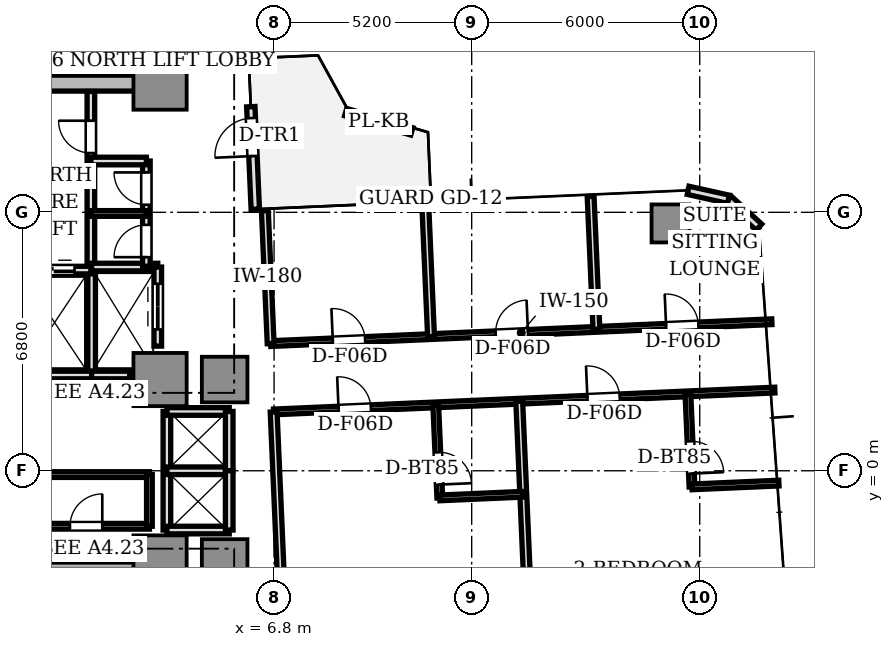
"""IFC4 building model, lengths in metres.
Left out: names, types, materials, properties, quantities, classifications, styles, units other than length and angle.
Written with IfcOpenShell. Run it as: python <this file> out.ifc"""

import sys

from ifc_helpers import new_model, si_unit, direction, frame, frame_2d, origin, origin_2d, place, context, subcontext, project, spatial, rectangle, extrude, source, transform, mapped, element, fill, save


model = new_model("IFC4")
c1 = context("Model", 3, precision=1e-05, world=origin(), true_north=direction((0.0, 1.0)))
c2 = subcontext(c1, "Body", "Model", "MODEL_VIEW")
j1 = project(units=[si_unit("LENGTHUNIT", "METRE"), si_unit("PLANEANGLEUNIT", "RADIAN")], contexts=[c1])
p1 = place(None, origin())
s1 = spatial("IfcSite", under=j1, at=p1, CompositionType="ELEMENT")
p2 = place(p1, origin())
s2 = spatial("IfcBuilding", under=s1, at=p2, CompositionType="ELEMENT")
p3 = place(p2, frame((0.0, 0.0, 131.55)))
s3 = spatial("IfcBuildingStorey", under=s2, at=p3, CompositionType="ELEMENT", Elevation=131.55)
p4 = place(p3, frame((-3.55, 10.2, 0.0), z_axis=(0.0, 0.0, 1.0), x_axis=(1.0, 0.0, 0.0)))
e1 = element("IfcWall", 1, at=p4, inside=s3, PredefinedType="SHEAR", context=c2, shape_type="SweptSolid", body=[
    extrude(rectangle(XDim=7.1, YDim=0.42, at=frame_2d((3.55, 0.0))), origin(), (0.0, 0.0, 1.0), 3.11),
])
m1 = source(origin(), c2, "Body", "SweptSolid", [
    extrude(rectangle(XDim=1.4, YDim=1.4, at=origin_2d()), origin(), (0.0, 0.0, 1.0), 3.11),
])
for number, where, z_axis, x_axis in (
    (2, (3.8, 2.4, 0.0), (0.0, 0.0, 1.0), (1.0, 0.0, 0.0)),
    (3, (3.8, 10.2, 0.0), (0.0, 0.0, 1.0), (1.0, 0.0, 0.0)),
    (4, (3.8, -2.4, 0.0), (0.0, 0.0, 1.0), (1.0, 0.0, 0.0)),
):
    element("IfcColumn", number, at=place(p3, frame(where, z_axis=z_axis, x_axis=x_axis)), inside=s3, PredefinedType="COLUMN", context=c2, shape_type="MappedRepresentation", body=[
        mapped(m1, transform((0.0, 0.0, 0.0), scale=1.0)),
    ])
m2 = source(origin(), c2, "Body", "SweptSolid", [
    extrude(rectangle(XDim=1.2, YDim=1.2, at=origin_2d()), origin(), (0.0, 0.0, 1.0), 3.11),
])
for number, where, z_axis, x_axis in (
    (5, (5.5, 2.4, 0.0), (0.0, 0.0, 1.0), (1.0, 0.0, 0.0)),
    (6, (5.5, -2.4, 0.0), (0.0, 0.0, 1.0), (1.0, 0.0, 0.0)),
):
    element("IfcColumn", number, at=place(p3, frame(where, z_axis=z_axis, x_axis=x_axis)), inside=s3, PredefinedType="COLUMN", context=c2, shape_type="MappedRepresentation", body=[
        mapped(m2, transform((0.0, 0.0, 0.0), scale=1.0)),
    ])
m3 = source(origin(), c2, "Body", "SweptSolid", [
    extrude(rectangle(XDim=1.0, YDim=1.0, at=origin_2d()), origin(), (0.0, 0.0, 1.0), 3.11),
])
p5 = place(p3, frame((17.232, 6.508, 0.0), z_axis=(0.0, 0.0, 1.0), x_axis=(1.0, 0.0, 0.0)))
e7 = element("IfcColumn", 7, at=p5, inside=s3, PredefinedType="COLUMN", context=c2, shape_type="MappedRepresentation", body=[
    mapped(m3, transform((0.0, 0.0, 0.0), scale=1.0)),
])
p6 = place(p3, frame((19.558, 6.409, 0.0), z_axis=(0.0, 0.0, 1.0), x_axis=(-0.737210081318, 0.675663596772, 0.0)))
e8 = element("IfcWall", 8, at=p6, inside=s3, PredefinedType="STANDARD", context=c2, shape_type="SweptSolid", body=[
    extrude(rectangle(XDim=1.087, YDim=0.22, at=frame_2d((0.543, 0.0))), origin(), (0.0, 0.0, 1.0), 3.11),
])
p7 = place(p3, frame((18.756, 7.144, 0.0), z_axis=(0.0, 0.0, 1.0), x_axis=(-0.976282085775, 0.216502399514, 0.0)))
e9 = element("IfcWall", 9, at=p7, inside=s3, PredefinedType="STANDARD", context=c2, shape_type="SweptSolid", body=[
    extrude(rectangle(XDim=1.087, YDim=0.22, at=frame_2d((0.543, 0.0))), origin(), (0.0, 0.0, 1.0), 3.11),
])
p8 = place(p3, frame((6.306, 6.882, 0.0), z_axis=(0.0, 0.0, 1.0), x_axis=(-0.043672655174, 0.999045894436, 0.0)))
e10 = element("IfcWall", 10, at=p8, inside=s3, PredefinedType="STANDARD", context=c2, shape_type="SweptSolid", body=[
    extrude(rectangle(XDim=2.7, YDim=0.22, at=frame_2d((1.35, 0.0))), origin(), (0.0, 0.0, 1.0), 3.11),
])
p9 = place(p8, frame((1.4, 0.0, 0.0)))
e11 = element("IfcOpeningElement", 11, at=p9, cuts=e10, PredefinedType="OPENING", context=c2, shape_type="SweptSolid", body=[
    extrude(rectangle(XDim=1.0, YDim=2.2, at=frame_2d((0.5, 1.1))), frame((0.0, 0.12, 0.0), z_axis=(0.0, -1.0, 0.0), x_axis=(1.0, 0.0, 0.0)), (0.0, 0.0, 1.0), 0.24),
])
p10 = place(p3, frame((10.424, 8.93, 0.0), z_axis=(0.0, 0.0, 1.0), x_axis=(-0.960055834773, 0.279808495436, 0.0)))
e12 = element("IfcWall", 12, at=p10, inside=s3, PredefinedType="PARAPET", context=c2, shape_type="SweptSolid", body=[
    extrude(rectangle(XDim=1.811, YDim=0.2, at=frame_2d((0.906, 0.0))), origin(), (0.0, 0.0, 1.0), 0.65),
])
p11 = place(p3, frame((0.0, -2.5, 0.0), z_axis=(0.0, 0.0, 1.0), x_axis=(1.0, 0.0, 0.0)))
e13 = element("IfcWall", 13, at=p11, inside=s3, PredefinedType="SOLIDWALL", context=c2, shape_type="SweptSolid", body=[
    extrude(rectangle(XDim=3.72, YDim=0.2, at=frame_2d((1.86, 0.0))), origin(), (0.0, 0.0, 1.0), 3.11),
])
p12 = place(p3, frame((1.98, 5.32, 0.0), z_axis=(0.0, 0.0, 1.0), x_axis=(0.0, 1.0, 0.0)))
e14 = element("IfcWall", 14, at=p12, inside=s3, PredefinedType="SOLIDWALL", context=c2, shape_type="SweptSolid", body=[
    extrude(rectangle(XDim=4.66, YDim=0.2, at=frame_2d((2.33, 0.0))), origin(), (0.0, 0.0, 1.0), 2.66),
])
p13 = place(p12, frame((3.04, 0.0, 0.0)))
e15 = element("IfcOpeningElement", 15, at=p13, cuts=e14, PredefinedType="OPENING", context=c2, shape_type="SweptSolid", body=[
    extrude(rectangle(XDim=0.85, YDim=2.1, at=frame_2d((0.425, 1.05))), frame((0.0, 0.11, 0.0), z_axis=(0.0, -1.0, 0.0), x_axis=(1.0, 0.0, 0.0)), (0.0, 0.0, 1.0), 0.22),
])
p14 = place(p3, frame((2.0, 2.5, 0.0), z_axis=(0.0, 0.0, 1.0), x_axis=(0.0, 1.0, 0.0)))
e16 = element("IfcWall", 16, at=p14, inside=s3, PredefinedType="SOLIDWALL", context=c2, shape_type="SweptSolid", body=[
    extrude(rectangle(XDim=2.78, YDim=0.2, at=frame_2d((1.39, 0.0))), origin(), (0.0, 0.0, 1.0), 2.66),
])
p15 = place(p3, frame((0.05, 2.52, 0.0), z_axis=(0.0, 0.0, 1.0), x_axis=(1.0, 0.0, 0.0)))
e17 = element("IfcWall", 17, at=p15, inside=s3, PredefinedType="SOLIDWALL", context=c2, shape_type="SweptSolid", body=[
    extrude(rectangle(XDim=1.95, YDim=0.2, at=frame_2d((0.975, 0.0))), origin(), (0.0, 0.0, 1.0), 2.66),
])
p16 = place(p3, frame((0.05, 5.28, 0.0), z_axis=(0.0, 0.0, 1.0), x_axis=(1.0, 0.0, 0.0)))
e18 = element("IfcWall", 18, at=p16, inside=s3, PredefinedType="SOLIDWALL", context=c2, shape_type="SweptSolid", body=[
    extrude(rectangle(XDim=1.93, YDim=0.2, at=frame_2d((0.965, 0.0))), origin(), (0.0, 0.0, 1.0), 2.66),
])
p17 = place(p16, frame((0.4, 0.0, 0.0)))
e19 = element("IfcOpeningElement", 19, at=p17, cuts=e18, PredefinedType="OPENING", context=c2, shape_type="SweptSolid", body=[
    extrude(rectangle(XDim=1.1, YDim=2.2, at=frame_2d((0.55, 1.1))), frame((0.0, 0.11, 0.0), z_axis=(0.0, -1.0, 0.0), x_axis=(1.0, 0.0, 0.0)), (0.0, 0.0, 1.0), 0.22),
])
p18 = place(p3, frame((2.0, 2.52, 0.0), z_axis=(0.0, 0.0, 1.0), x_axis=(1.0, 0.0, 0.0)))
e20 = element("IfcWall", 20, at=p18, inside=s3, PredefinedType="SOLIDWALL", context=c2, shape_type="SweptSolid", body=[
    extrude(rectangle(XDim=1.0, YDim=0.2, at=frame_2d((0.5, 0.0))), origin(), (0.0, 0.0, 1.0), 2.66),
])
p19 = place(p3, frame((2.0, 5.36, 0.0), z_axis=(0.0, 0.0, 1.0), x_axis=(1.0, 0.0, 0.0)))
e21 = element("IfcWall", 21, at=p19, inside=s3, PredefinedType="SOLIDWALL", context=c2, shape_type="SweptSolid", body=[
    extrude(rectangle(XDim=1.74, YDim=0.2, at=frame_2d((0.87, 0.0))), origin(), (0.0, 0.0, 1.0), 2.66),
])
p20 = place(p3, frame((3.74, 3.28, 0.0), z_axis=(0.0, 0.0, 1.0), x_axis=(0.0, 1.0, 0.0)))
e22 = element("IfcWall", 22, at=p20, inside=s3, PredefinedType="SOLIDWALL", context=c2, shape_type="SweptSolid", body=[
    extrude(rectangle(XDim=2.08, YDim=0.2, at=frame_2d((1.04, 0.0))), origin(), (0.0, 0.0, 1.0), 2.66),
])
p21 = place(p20, frame((0.44, 0.0, 0.0)))
e23 = element("IfcOpeningElement", 23, at=p21, cuts=e22, PredefinedType="OPENING", context=c2, shape_type="SweptSolid", body=[
    extrude(rectangle(XDim=1.2, YDim=2.2, at=frame_2d((0.6, 1.1))), frame((0.0, 0.11, 0.0), z_axis=(0.0, -1.0, 0.0), x_axis=(1.0, 0.0, 0.0)), (0.0, 0.0, 1.0), 0.22),
])
p22 = place(p3, frame((3.98, -1.56, 0.0), z_axis=(0.0, 0.0, 1.0), x_axis=(0.0, 1.0, 0.0)))
e24 = element("IfcWall", 24, at=p22, inside=s3, PredefinedType="SOLIDWALL", context=c2, shape_type="SweptSolid", body=[
    extrude(rectangle(XDim=3.12, YDim=0.2, at=frame_2d((1.56, 0.0))), origin(), (0.0, 0.0, 1.0), 2.28),
])
for number, where, z_axis, x_axis in (
    (25, (3.98, 1.56, 0.0), (0.0, 0.0, 1.0), (1.0, 0.0, 0.0)),
    (26, (3.98, -1.56, 0.0), (0.0, 0.0, 1.0), (1.0, 0.0, 0.0)),
    (27, (3.98, 0.0, 0.0), (0.0, 0.0, 1.0), (1.0, 0.0, 0.0)),
):
    element("IfcWall", number, at=place(p3, frame(where, z_axis=z_axis, x_axis=x_axis)), inside=s3, PredefinedType="SOLIDWALL", context=c2, shape_type="SweptSolid", body=[
        extrude(rectangle(XDim=1.64, YDim=0.2, at=frame_2d((0.82, 0.0))), origin(), (0.0, 0.0, 1.0), 2.66),
    ])
for number, where, z_axis, x_axis in (
    (28, (5.62, 0.0, 0.0), (0.0, 0.0, 1.0), (0.0, 1.0, 0.0)),
    (29, (5.62, -1.56, 0.0), (0.0, 0.0, 1.0), (0.0, 1.0, 0.0)),
):
    element("IfcWall", number, at=place(p3, frame(where, z_axis=z_axis, x_axis=x_axis)), inside=s3, PredefinedType="SOLIDWALL", context=c2, shape_type="SweptSolid", body=[
        extrude(rectangle(XDim=1.56, YDim=0.2, at=frame_2d((0.78, 0.0))), origin(), (0.0, 0.0, 1.0), 2.66),
    ])
p23 = place(p3, frame((3.44, 5.38, 0.0), z_axis=(0.0, 0.0, 1.0), x_axis=(0.0, 1.0, 0.0)))
e30 = element("IfcWall", 30, at=p23, inside=s3, PredefinedType="SOLIDWALL", context=c2, shape_type="SweptSolid", body=[
    extrude(rectangle(XDim=2.77, YDim=0.2, at=frame_2d((1.385, 0.0))), origin(), (0.0, 0.0, 1.0), 2.66),
])
p24 = place(p23, frame((0.24, 0.0, 0.0)))
e31 = element("IfcOpeningElement", 31, at=p24, cuts=e30, PredefinedType="OPENING", context=c2, shape_type="SweptSolid", body=[
    extrude(rectangle(XDim=0.85, YDim=2.1, at=frame_2d((0.425, 1.05))), frame((0.0, 0.11, 0.0), z_axis=(0.0, -1.0, 0.0), x_axis=(1.0, 0.0, 0.0)), (0.0, 0.0, 1.0), 0.22),
])
p25 = place(p23, frame((1.62, 0.0, 0.0)))
e32 = element("IfcOpeningElement", 32, at=p25, cuts=e30, PredefinedType="OPENING", context=c2, shape_type="SweptSolid", body=[
    extrude(rectangle(XDim=0.85, YDim=2.1, at=frame_2d((0.425, 1.05))), frame((0.0, 0.11, 0.0), z_axis=(0.0, -1.0, 0.0), x_axis=(1.0, 0.0, 0.0)), (0.0, 0.0, 1.0), 0.22),
])
p26 = place(p3, frame((1.98, 8.15, 0.0), z_axis=(0.0, 0.0, 1.0), x_axis=(1.0, 0.0, 0.0)))
e33 = element("IfcWall", 33, at=p26, inside=s3, PredefinedType="SOLIDWALL", context=c2, shape_type="SweptSolid", body=[
    extrude(rectangle(XDim=1.46, YDim=0.2, at=frame_2d((0.73, 0.0))), origin(), (0.0, 0.0, 1.0), 2.66),
])
p27 = place(p3, frame((1.98, 6.77, 0.0), z_axis=(0.0, 0.0, 1.0), x_axis=(1.0, 0.0, 0.0)))
e34 = element("IfcWall", 34, at=p27, inside=s3, PredefinedType="PARTITIONING", context=c2, shape_type="SweptSolid", body=[
    extrude(rectangle(XDim=1.46, YDim=0.15, at=frame_2d((0.73, 0.0))), origin(), (0.0, 0.0, 1.0), 2.66),
])
p28 = place(p3, frame((0.38, -0.1, 0.0), z_axis=(0.0, 0.0, 1.0), x_axis=(1.0, 0.0, 0.0)))
e35 = element("IfcWall", 35, at=p28, inside=s3, PredefinedType="PARTITIONING", context=c2, shape_type="SweptSolid", body=[
    extrude(rectangle(XDim=3.14, YDim=0.15, at=frame_2d((1.57, 0.0))), origin(), (0.0, 0.0, 1.0), 2.66),
])
p29 = place(p3, frame((0.38, -1.46, 0.0), z_axis=(0.0, 0.0, 1.0), x_axis=(1.0, 0.0, 0.0)))
e36 = element("IfcWall", 36, at=p29, inside=s3, PredefinedType="PARTITIONING", context=c2, shape_type="SweptSolid", body=[
    extrude(rectangle(XDim=3.14, YDim=0.15, at=frame_2d((1.57, 0.0))), origin(), (0.0, 0.0, 1.0), 2.66),
])
p30 = place(p29, frame((1.05, 0.0, 0.0)))
e37 = element("IfcOpeningElement", 37, at=p30, cuts=e36, PredefinedType="OPENING", context=c2, shape_type="SweptSolid", body=[
    extrude(rectangle(XDim=0.85, YDim=2.1, at=frame_2d((0.425, 1.05))), frame((0.0, 0.085, 0.0), z_axis=(0.0, -1.0, 0.0), x_axis=(1.0, 0.0, 0.0)), (0.0, 0.0, 1.0), 0.17),
])
p31 = place(p3, frame((3.52, -1.46, 0.0), z_axis=(0.0, 0.0, 1.0), x_axis=(0.0, 1.0, 0.0)))
e38 = element("IfcWall", 38, at=p31, inside=s3, PredefinedType="PARTITIONING", context=c2, shape_type="SweptSolid", body=[
    extrude(rectangle(XDim=1.36, YDim=0.15, at=frame_2d((0.68, 0.0))), origin(), (0.0, 0.0, 1.0), 2.28),
])
p32 = place(p3, frame((6.71, 3.346, 0.0), z_axis=(0.0, 0.0, 1.0), x_axis=(0.999048535483, 0.04361219725, 0.0)))
e39 = element("IfcWall", 39, at=p32, inside=s3, PredefinedType="PARTITIONING", context=c2, shape_type="SweptSolid", body=[
    extrude(rectangle(XDim=13.2, YDim=0.15, at=frame_2d((6.6, 0.0))), origin(), (0.0, 0.0, 1.0), 2.63),
])
p33 = place(p32, frame((1.637, 0.0, 0.0)))
e40 = element("IfcOpeningElement", 40, at=p33, cuts=e39, PredefinedType="OPENING", context=c2, shape_type="SweptSolid", body=[
    extrude(rectangle(XDim=0.85, YDim=2.1, at=frame_2d((0.425, 1.05))), frame((0.0, 0.085, 0.0), z_axis=(0.0, -1.0, 0.0), x_axis=(1.0, 0.0, 0.0)), (0.0, 0.0, 1.0), 0.17),
])
p34 = place(p32, frame((5.927, 0.0, 0.0)))
e41 = element("IfcOpeningElement", 41, at=p34, cuts=e39, PredefinedType="OPENING", context=c2, shape_type="SweptSolid", body=[
    extrude(rectangle(XDim=0.85, YDim=2.1, at=frame_2d((0.425, 1.05))), frame((0.0, 0.085, 0.0), z_axis=(0.0, -1.0, 0.0), x_axis=(1.0, 0.0, 0.0)), (0.0, 0.0, 1.0), 0.17),
])
p35 = place(p32, frame((10.415, 0.0, 0.0)))
e42 = element("IfcOpeningElement", 42, at=p35, cuts=e39, PredefinedType="OPENING", context=c2, shape_type="SweptSolid", body=[
    extrude(rectangle(XDim=0.85, YDim=2.1, at=frame_2d((0.425, 1.05))), frame((0.0, 0.085, 0.0), z_axis=(0.0, -1.0, 0.0), x_axis=(1.0, 0.0, 0.0)), (0.0, 0.0, 1.0), 0.17),
])
p36 = place(p3, frame((6.789, 1.548, 0.0), z_axis=(0.0, 0.0, 1.0), x_axis=(0.999048500303, 0.043613003123, 0.0)))
e43 = element("IfcWall", 43, at=p36, inside=s3, PredefinedType="PARTITIONING", context=c2, shape_type="SweptSolid", body=[
    extrude(rectangle(XDim=13.2, YDim=0.15, at=frame_2d((6.6, 0.0))), origin(), (0.0, 0.0, 1.0), 2.66),
])
p37 = place(p36, frame((1.71, 0.0, 0.0)))
e44 = element("IfcOpeningElement", 44, at=p37, cuts=e43, PredefinedType="OPENING", context=c2, shape_type="SweptSolid", body=[
    extrude(rectangle(XDim=0.85, YDim=2.1, at=frame_2d((0.425, 1.05))), frame((0.0, 0.085, 0.0), z_axis=(0.0, -1.0, 0.0), x_axis=(1.0, 0.0, 0.0)), (0.0, 0.0, 1.0), 0.17),
])
p38 = place(p36, frame((8.264, 0.0, 0.0)))
e45 = element("IfcOpeningElement", 45, at=p38, cuts=e43, PredefinedType="OPENING", context=c2, shape_type="SweptSolid", body=[
    extrude(rectangle(XDim=0.85, YDim=2.1, at=frame_2d((0.425, 1.05))), frame((0.0, 0.085, 0.0), z_axis=(0.0, -1.0, 0.0), x_axis=(1.0, 0.0, 0.0)), (0.0, 0.0, 1.0), 0.17),
])
p39 = place(p3, frame((6.71, 3.346, 0.0), z_axis=(0.0, 0.0, 1.0), x_axis=(-0.043597663116, 0.999049169846, 0.0)))
e46 = element("IfcWall", 46, at=p39, inside=s3, PredefinedType="PARTITIONING", context=c2, shape_type="SweptSolid", body=[
    extrude(rectangle(XDim=3.5, YDim=0.18, at=frame_2d((1.75, 0.0))), origin(), (0.0, 0.0, 1.0), 2.66),
])
p40 = place(p3, frame((7.129, -6.245, 0.0), z_axis=(0.0, 0.0, 1.0), x_axis=(-0.043600217373, 0.999049058378, 0.0)))
e47 = element("IfcWall", 47, at=p40, inside=s3, PredefinedType="PARTITIONING", context=c2, shape_type="SweptSolid", body=[
    extrude(rectangle(XDim=7.8, YDim=0.18, at=frame_2d((3.9, 0.0))), origin(), (0.0, 0.0, 1.0), 2.66),
])
p41 = place(p3, frame((10.93, 3.53, 0.0), z_axis=(0.0, 0.0, 1.0), x_axis=(-0.04359462501, 0.999049302422, 0.0)))
e48 = element("IfcWall", 48, at=p41, inside=s3, PredefinedType="PARTITIONING", context=c2, shape_type="SweptSolid", body=[
    extrude(rectangle(XDim=3.5, YDim=0.18, at=frame_2d((1.75, 0.0))), origin(), (0.0, 0.0, 1.0), 2.66),
])
p42 = place(p3, frame((15.282, 3.72, 0.0), z_axis=(0.0, 0.0, 1.0), x_axis=(-0.043597663116, 0.999049169846, 0.0)))
e49 = element("IfcWall", 49, at=p42, inside=s3, PredefinedType="PARTITIONING", context=c2, shape_type="SweptSolid", body=[
    extrude(rectangle(XDim=3.5, YDim=0.18, at=frame_2d((1.75, 0.0))), origin(), (0.0, 0.0, 1.0), 2.66),
])
p43 = place(p3, frame((13.251, 1.83, 0.0), z_axis=(0.0, 0.0, 1.0), x_axis=(0.043632821702, -0.999047634936, 0.0)))
e50 = element("IfcWall", 50, at=p43, inside=s3, PredefinedType="PARTITIONING", context=c2, shape_type="SweptSolid", body=[
    extrude(rectangle(XDim=7.8, YDim=0.18, at=frame_2d((3.9, 0.0))), origin(), (0.0, 0.0, 1.0), 2.66),
])
p44 = place(p3, frame((11.054, 1.734, 0.0), z_axis=(0.0, 0.0, 1.0), x_axis=(0.043644787072, -0.999047112283, 0.0)))
e51 = element("IfcWall", 51, at=p44, inside=s3, PredefinedType="PARTITIONING", context=c2, shape_type="SweptSolid", body=[
    extrude(rectangle(XDim=2.45, YDim=0.15, at=frame_2d((1.225, 0.0))), origin(), (0.0, 0.0, 1.0), 2.66),
])
p45 = place(p44, frame((1.25, 0.0, 0.0)))
e52 = element("IfcOpeningElement", 52, at=p45, cuts=e51, PredefinedType="OPENING", context=c2, shape_type="SweptSolid", body=[
    extrude(rectangle(XDim=0.85, YDim=2.1, at=frame_2d((0.425, 1.05))), frame((0.0, 0.085, 0.0), z_axis=(0.0, -1.0, 0.0), x_axis=(1.0, 0.0, 0.0)), (0.0, 0.0, 1.0), 0.17),
])
p46 = place(p3, frame((11.161, -0.714, 0.0), z_axis=(0.0, 0.0, 1.0), x_axis=(0.999047549714, 0.043634772954, 0.0)))
e53 = element("IfcWall", 53, at=p46, inside=s3, PredefinedType="PARTITIONING", context=c2, shape_type="SweptSolid", body=[
    extrude(rectangle(XDim=2.199, YDim=0.15, at=frame_2d((1.1, 0.0))), origin(), (0.0, 0.0, 1.0), 2.66),
])
p47 = place(p3, frame((17.69, 2.023, 0.0), z_axis=(0.0, 0.0, 1.0), x_axis=(0.043549666039, -0.999051263243, 0.0)))
e54 = element("IfcWall", 54, at=p47, inside=s3, PredefinedType="PARTITIONING", context=c2, shape_type="SweptSolid", body=[
    extrude(rectangle(XDim=2.45, YDim=0.15, at=frame_2d((1.225, 0.0))), origin(), (0.0, 0.0, 1.0), 2.58),
])
p48 = place(p47, frame((1.25, 0.0, 0.0)))
e55 = element("IfcOpeningElement", 55, at=p48, cuts=e54, PredefinedType="OPENING", context=c2, shape_type="SweptSolid", body=[
    extrude(rectangle(XDim=0.85, YDim=2.1, at=frame_2d((0.425, 1.05))), frame((0.0, 0.085, 0.0), z_axis=(0.0, -1.0, 0.0), x_axis=(1.0, 0.0, 0.0)), (0.0, 0.0, 1.0), 0.17),
])
p49 = place(p3, frame((17.796, -0.424, 0.0), z_axis=(0.0, 0.0, 1.0), x_axis=(0.99904809168, 0.043622362496, 0.0)))
e56 = element("IfcWall", 56, at=p49, inside=s3, PredefinedType="PARTITIONING", context=c2, shape_type="SweptSolid", body=[
    extrude(rectangle(XDim=2.289, YDim=0.15, at=frame_2d((1.145, 0.0))), origin(), (0.0, 0.0, 1.0), 2.66),
])
m4 = source(origin(), c2, "Body", "SweptSolid", [
    extrude(rectangle(XDim=1.0, YDim=0.05, at=origin_2d()), origin(), (0.0, 0.0, 1.0), 2.2),
])
p50 = place(p9, frame((0.5, 0.0, 0.0)))
e57 = element("IfcDoor", 57, at=p50, inside=s3, OperationType="SINGLE_SWING_LEFT", PredefinedType="DOOR", context=c2, shape_type="MappedRepresentation", body=[
    mapped(m4, transform((0.0, 0.0, 0.0), scale=1.0)),
])
fill(e11, e57)
m5 = source(origin(), c2, "Body", "SweptSolid", [
    extrude(rectangle(XDim=0.85, YDim=0.05, at=origin_2d()), origin(), (0.0, 0.0, 1.0), 2.1),
])
p51 = place(p13, frame((0.425, 0.0, 0.0)))
e58 = element("IfcDoor", 58, at=p51, inside=s3, OperationType="SINGLE_SWING_RIGHT", PredefinedType="DOOR", context=c2, shape_type="MappedRepresentation", body=[
    mapped(m5, transform((0.0, 0.0, 0.0), scale=1.0)),
])
fill(e15, e58)
m6 = source(origin(), c2, "Body", "SweptSolid", [
    extrude(rectangle(XDim=1.1, YDim=0.05, at=origin_2d()), origin(), (0.0, 0.0, 1.0), 2.2),
])
p52 = place(p17, frame((0.55, 0.0, 0.0)))
e59 = element("IfcDoor", 59, at=p52, inside=s3, OperationType="DOUBLE_DOOR_SLIDING", PredefinedType="DOOR", context=c2, shape_type="MappedRepresentation", body=[
    mapped(m6, transform((0.0, 0.0, 0.0), scale=1.0)),
])
fill(e19, e59)
m7 = source(origin(), c2, "Body", "SweptSolid", [
    extrude(rectangle(XDim=1.2, YDim=0.05, at=origin_2d()), origin(), (0.0, 0.0, 1.0), 2.2),
])
p53 = place(p21, frame((0.6, 0.0, 0.0)))
e60 = element("IfcDoor", 60, at=p53, inside=s3, OperationType="DOUBLE_DOOR_SLIDING", PredefinedType="DOOR", context=c2, shape_type="MappedRepresentation", body=[
    mapped(m7, transform((0.0, 0.0, 0.0), scale=1.0)),
])
fill(e23, e60)
p54 = place(p24, frame((0.425, 0.0, 0.0)))
e61 = element("IfcDoor", 61, at=p54, inside=s3, OperationType="SINGLE_SWING_LEFT", PredefinedType="DOOR", context=c2, shape_type="MappedRepresentation", body=[
    mapped(m5, transform((0.0, 0.0, 0.0), scale=1.0)),
])
fill(e31, e61)
p55 = place(p25, frame((0.425, 0.0, 0.0)))
e62 = element("IfcDoor", 62, at=p55, inside=s3, OperationType="SINGLE_SWING_RIGHT", PredefinedType="DOOR", context=c2, shape_type="MappedRepresentation", body=[
    mapped(m5, transform((0.0, 0.0, 0.0), scale=1.0)),
])
fill(e32, e62)
p56 = place(p30, frame((0.425, 0.0, 0.0)))
e63 = element("IfcDoor", 63, at=p56, inside=s3, OperationType="SINGLE_SWING_RIGHT", PredefinedType="DOOR", context=c2, shape_type="MappedRepresentation", body=[
    mapped(m5, transform((0.0, 0.0, 0.0), scale=1.0)),
])
fill(e37, e63)
p57 = place(p33, frame((0.425, 0.0, 0.0)))
e64 = element("IfcDoor", 64, at=p57, inside=s3, OperationType="SINGLE_SWING_LEFT", PredefinedType="DOOR", context=c2, shape_type="MappedRepresentation", body=[
    mapped(m5, transform((0.0, 0.0, 0.0), scale=1.0)),
])
fill(e40, e64)
p58 = place(p34, frame((0.425, 0.0, 0.0)))
e65 = element("IfcDoor", 65, at=p58, inside=s3, OperationType="SINGLE_SWING_RIGHT", PredefinedType="DOOR", context=c2, shape_type="MappedRepresentation", body=[
    mapped(m5, transform((0.0, 0.0, 0.0), scale=1.0)),
])
fill(e41, e65)
p59 = place(p35, frame((0.425, 0.0, 0.0)))
e66 = element("IfcDoor", 66, at=p59, inside=s3, OperationType="SINGLE_SWING_LEFT", PredefinedType="DOOR", context=c2, shape_type="MappedRepresentation", body=[
    mapped(m5, transform((0.0, 0.0, 0.0), scale=1.0)),
])
fill(e42, e66)
p60 = place(p45, frame((0.425, 0.0, 0.0)))
e67 = element("IfcDoor", 67, at=p60, inside=s3, OperationType="SINGLE_SWING_RIGHT", PredefinedType="DOOR", context=c2, shape_type="MappedRepresentation", body=[
    mapped(m5, transform((0.0, 0.0, 0.0), scale=1.0)),
])
fill(e52, e67)
p61 = place(p37, frame((0.425, 0.0, 0.0)))
e68 = element("IfcDoor", 68, at=p61, inside=s3, OperationType="SINGLE_SWING_LEFT", PredefinedType="DOOR", context=c2, shape_type="MappedRepresentation", body=[
    mapped(m5, transform((0.0, 0.0, 0.0), scale=1.0)),
])
fill(e44, e68)
p62 = place(p48, frame((0.425, 0.0, 0.0)))
e69 = element("IfcDoor", 69, at=p62, inside=s3, OperationType="SINGLE_SWING_RIGHT", PredefinedType="DOOR", context=c2, shape_type="MappedRepresentation", body=[
    mapped(m5, transform((0.0, 0.0, 0.0), scale=1.0)),
])
fill(e55, e69)
p63 = place(p38, frame((0.425, 0.0, 0.0)))
e70 = element("IfcDoor", 70, at=p63, inside=s3, OperationType="SINGLE_SWING_LEFT", PredefinedType="DOOR", context=c2, shape_type="MappedRepresentation", body=[
    mapped(m5, transform((0.0, 0.0, 0.0), scale=1.0)),
])
fill(e45, e70)
save(model, sys.argv[1])
